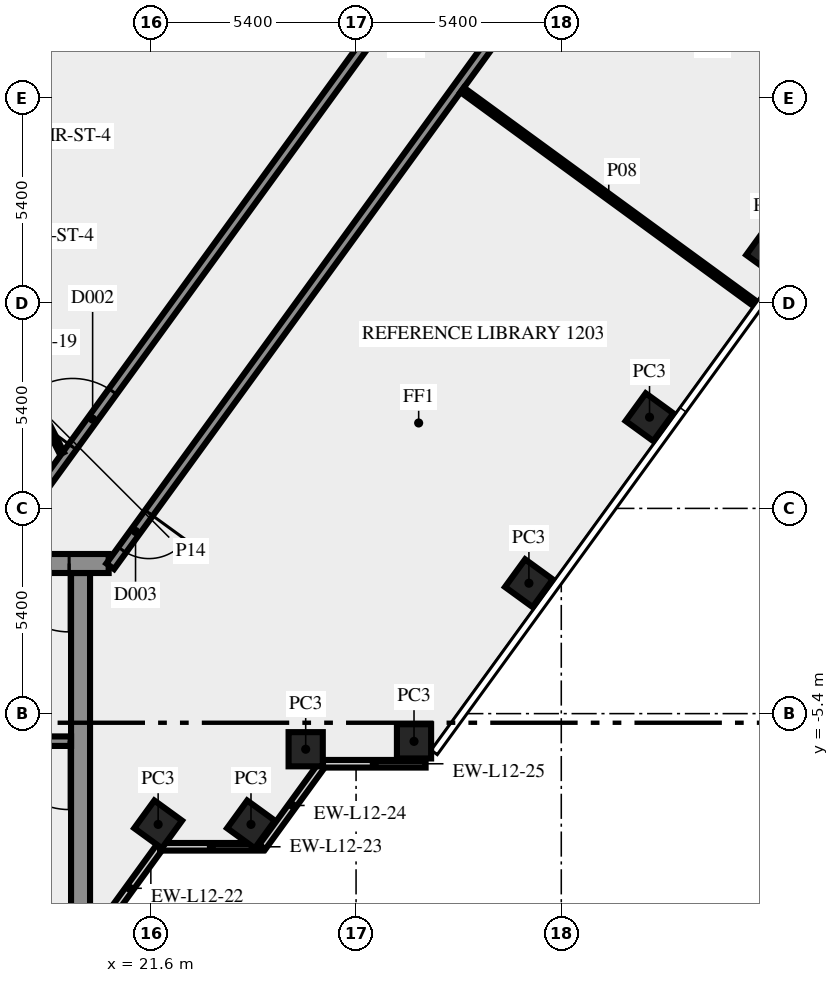
"""IFC4 building model, lengths in metres.
Left out: names, types, materials, properties, quantities, classifications, styles, units other than length and angle.
Written with IfcOpenShell. Run it as: python <this file> out.ifc"""

import sys

from ifc_helpers import new_model, si_unit, direction, frame, frame_2d, origin, origin_2d, place, context, subcontext, project, spatial, rectangle, extrude, element, fill, save


model = new_model("IFC4")
c1 = context("Model", 3, precision=1e-05, world=origin(), true_north=direction((0.0, 1.0)))
c2 = subcontext(c1, "Body", "Model", "MODEL_VIEW")
j1 = project(units=[si_unit("LENGTHUNIT", "METRE"), si_unit("PLANEANGLEUNIT", "RADIAN")], contexts=[c1])
p1 = place(None, origin())
s1 = spatial("IfcSite", under=j1, at=p1, CompositionType="ELEMENT")
p2 = place(p1, origin())
s2 = spatial("IfcBuilding", under=s1, at=p2, CompositionType="ELEMENT")
p3 = place(p2, frame((0.0, 0.0, 55.0)))
s3 = spatial("IfcBuildingStorey", under=s2, at=p3, CompositionType="ELEMENT", Elevation=55.0)
for number, where, z_axis, x_axis in (
    (1, (21.792, -8.315, 0.0), (0.0, 0.0, 1.0), (0.588, 0.809, 0.0)),
    (2, (24.235, -8.315, 0.0), (0.0, 0.0, 1.0), (0.588, 0.809, 0.0)),
    (3, (25.674, -6.337, 0.0), (0.0, 0.0, 1.0), (1.0, 0.0, 0.0)),
    (4, (28.525, -6.13, 0.0), (0.0, 0.0, 1.0), (1.0, 0.0, 0.0)),
    (5, (31.548, -1.969, 0.0), (0.0, 0.0, 1.0), (0.588, 0.809, 0.0)),
    (6, (34.722, 2.4, 0.0), (0.0, 0.0, 1.0), (0.588, 0.809, 0.0)),
    (7, (37.896, 6.769, 0.0), (0.0, 0.0, 1.0), (0.588, 0.809, 0.0)),
):
    element("IfcColumn", number, at=place(p3, frame(where, z_axis=z_axis, x_axis=x_axis)), inside=s3, PredefinedType="COLUMN", context=c2, shape_type="SweptSolid", body=[
        extrude(rectangle(XDim=0.9, YDim=0.9, at=origin_2d()), origin(), (0.0, 0.0, 1.0), 3.65),
    ])
p4 = place(p3, frame((20.253, -11.083, 0.0), z_axis=(0.0, 0.0, 1.0), x_axis=(0.587766567315, 0.809030569476, 0.0)))
e8 = element("IfcWall", 8, at=p4, inside=s3, PredefinedType="SOLIDWALL", context=c2, shape_type="SweptSolid", body=[
    extrude(rectangle(XDim=2.688, YDim=0.2, at=frame_2d((1.344, 0.0))), origin(), (0.0, 0.0, 1.0), 3.65),
])
p5 = place(p3, frame((21.843, -8.904, 0.0), z_axis=(0.0, 0.0, 1.0), x_axis=(1.0, 0.0, 0.0)))
e9 = element("IfcWall", 9, at=p5, inside=s3, PredefinedType="SOLIDWALL", context=c2, shape_type="SweptSolid", body=[
    extrude(rectangle(XDim=2.7, YDim=0.2, at=frame_2d((1.35, 0.0))), origin(), (0.0, 0.0, 1.0), 3.65),
])
p6 = place(p3, frame((24.533, -8.909, 0.0), z_axis=(0.0, 0.0, 1.0), x_axis=(0.587720002413, 0.809064397168, 0.0)))
e10 = element("IfcWall", 10, at=p6, inside=s3, PredefinedType="SOLIDWALL", context=c2, shape_type="SweptSolid", body=[
    extrude(rectangle(XDim=2.7, YDim=0.2, at=frame_2d((1.35, 0.0))), origin(), (0.0, 0.0, 1.0), 3.65),
])
p7 = place(p3, frame((26.13, -6.719, 0.0), z_axis=(0.0, 0.0, 1.0), x_axis=(1.0, 0.0, 0.0)))
e11 = element("IfcWall", 11, at=p7, inside=s3, PredefinedType="SOLIDWALL", context=c2, shape_type="SweptSolid", body=[
    extrude(rectangle(XDim=2.7, YDim=0.2, at=frame_2d((1.35, 0.0))), origin(), (0.0, 0.0, 1.0), 3.65),
])
p8 = place(p3, frame((19.75, -10.5, 0.0), z_axis=(0.0, 0.0, 1.0), x_axis=(0.0, 1.0, 0.0)))
e12 = element("IfcWall", 12, at=p8, inside=s3, PredefinedType="SHEAR", context=c2, shape_type="SweptSolid", body=[
    extrude(rectangle(XDim=8.8, YDim=0.5, at=frame_2d((4.4, 0.0))), origin(), (0.0, 0.0, 1.0), 3.65),
])
p9 = place(p3, frame((19.5, -6.125, 0.0), z_axis=(0.0, 0.0, 1.0), x_axis=(-1.0, 0.0, 0.0)))
e13 = element("IfcWall", 13, at=p9, inside=s3, PredefinedType="SHEAR", context=c2, shape_type="SweptSolid", body=[
    extrude(rectangle(XDim=8.05, YDim=0.25, at=frame_2d((4.025, 0.0))), origin(), (0.0, 0.0, 1.0), 3.65),
])
p10 = place(p9, frame((0.05, 0.0, 0.0)))
e14 = element("IfcOpeningElement", 14, at=p10, cuts=e13, PredefinedType="OPENING", context=c2, shape_type="SweptSolid", body=[
    extrude(rectangle(XDim=1.8, YDim=2.1, at=frame_2d((0.9, 1.05))), frame((0.0, 0.135, 0.0), z_axis=(0.0, -1.0, 0.0), x_axis=(1.0, 0.0, 0.0)), (0.0, 0.0, 1.0), 0.27),
])
p11 = place(p3, frame((20.49, -1.45, 0.0), z_axis=(0.0, 0.0, 1.0), x_axis=(-1.0, 0.0, 0.0)))
e15 = element("IfcWall", 15, at=p11, inside=s3, PredefinedType="SHEAR", context=c2, shape_type="SweptSolid", body=[
    extrude(rectangle(XDim=40.98, YDim=0.5, at=frame_2d((20.49, 0.0))), origin(), (0.0, 0.0, 1.0), 3.65),
])
p12 = place(p11, frame((38.14, 0.0, 0.0)))
e16 = element("IfcOpeningElement", 16, at=p12, cuts=e15, PredefinedType="OPENING", context=c2, shape_type="SweptSolid", body=[
    extrude(rectangle(XDim=1.8, YDim=2.1, at=frame_2d((0.9, 1.05))), frame((0.0, 0.26, 0.0), z_axis=(0.0, -1.0, 0.0), x_axis=(1.0, 0.0, 0.0)), (0.0, 0.0, 1.0), 0.52),
])
p13 = place(p11, frame((35.89, 0.0, 0.0)))
e17 = element("IfcOpeningElement", 17, at=p13, cuts=e15, PredefinedType="OPENING", context=c2, shape_type="SweptSolid", body=[
    extrude(rectangle(XDim=0.9, YDim=2.1, at=frame_2d((0.45, 1.05))), frame((0.0, 0.26, 0.0), z_axis=(0.0, -1.0, 0.0), x_axis=(1.0, 0.0, 0.0)), (0.0, 0.0, 1.0), 0.52),
])
p14 = place(p11, frame((32.94, 0.0, 0.0)))
e18 = element("IfcOpeningElement", 18, at=p14, cuts=e15, PredefinedType="OPENING", context=c2, shape_type="SweptSolid", body=[
    extrude(rectangle(XDim=0.9, YDim=2.1, at=frame_2d((0.45, 1.05))), frame((0.0, 0.26, 0.0), z_axis=(0.0, -1.0, 0.0), x_axis=(1.0, 0.0, 0.0)), (0.0, 0.0, 1.0), 0.52),
])
p15 = place(p11, frame((19.59, 0.0, 0.0)))
e19 = element("IfcOpeningElement", 19, at=p15, cuts=e15, PredefinedType="OPENING", context=c2, shape_type="SweptSolid", body=[
    extrude(rectangle(XDim=2.0, YDim=2.1, at=frame_2d((1.0, 1.05))), frame((0.0, 0.26, 0.0), z_axis=(0.0, -1.0, 0.0), x_axis=(1.0, 0.0, 0.0)), (0.0, 0.0, 1.0), 0.52),
])
p16 = place(p11, frame((7.14, 0.0, 0.0)))
e20 = element("IfcOpeningElement", 20, at=p16, cuts=e15, PredefinedType="OPENING", context=c2, shape_type="SweptSolid", body=[
    extrude(rectangle(XDim=0.9, YDim=2.1, at=frame_2d((0.45, 1.05))), frame((0.0, 0.26, 0.0), z_axis=(0.0, -1.0, 0.0), x_axis=(1.0, 0.0, 0.0)), (0.0, 0.0, 1.0), 0.52),
])
p17 = place(p11, frame((5.028, 0.0, 0.0)))
e21 = element("IfcOpeningElement", 21, at=p17, cuts=e15, PredefinedType="OPENING", context=c2, shape_type="SweptSolid", body=[
    extrude(rectangle(XDim=0.8, YDim=2.1, at=frame_2d((0.4, 1.05))), frame((0.0, 0.26, 0.0), z_axis=(0.0, -1.0, 0.0), x_axis=(1.0, 0.0, 0.0)), (0.0, 0.0, 1.0), 0.52),
])
p18 = place(p11, frame((3.452, 0.0, 0.0)))
e22 = element("IfcOpeningElement", 22, at=p18, cuts=e15, PredefinedType="OPENING", context=c2, shape_type="SweptSolid", body=[
    extrude(rectangle(XDim=0.8, YDim=2.1, at=frame_2d((0.4, 1.05))), frame((0.0, 0.26, 0.0), z_axis=(0.0, -1.0, 0.0), x_axis=(1.0, 0.0, 0.0)), (0.0, 0.0, 1.0), 0.52),
])
p19 = place(p11, frame((1.04, 0.0, 0.0)))
e23 = element("IfcOpeningElement", 23, at=p19, cuts=e15, PredefinedType="OPENING", context=c2, shape_type="SweptSolid", body=[
    extrude(rectangle(XDim=1.8, YDim=2.1, at=frame_2d((0.9, 1.05))), frame((0.0, 0.26, 0.0), z_axis=(0.0, -1.0, 0.0), x_axis=(1.0, 0.0, 0.0)), (0.0, 0.0, 1.0), 0.52),
])
p20 = place(p3, frame((17.545, -1.125, 0.0), z_axis=(0.0, 0.0, 1.0), x_axis=(0.587786323093, 0.809016216391, 0.0)))
e24 = element("IfcWall", 24, at=p20, inside=s3, PredefinedType="SOLIDWALL", context=c2, shape_type="SweptSolid", body=[
    extrude(rectangle(XDim=33.493, YDim=0.25, at=frame_2d((16.747, 0.0))), origin(), (0.0, 0.0, 1.0), 3.65),
])
p21 = place(p20, frame((31.403, 0.0, 0.0)))
e25 = element("IfcOpeningElement", 25, at=p21, cuts=e24, PredefinedType="OPENING", context=c2, shape_type="SweptSolid", body=[
    extrude(rectangle(XDim=1.8, YDim=2.1, at=frame_2d((0.9, 1.05))), frame((0.0, 0.135, 0.0), z_axis=(0.0, -1.0, 0.0), x_axis=(1.0, 0.0, 0.0)), (0.0, 0.0, 1.0), 0.27),
])
p22 = place(p20, frame((3.392, 0.0, 0.0)))
e26 = element("IfcOpeningElement", 26, at=p22, cuts=e24, PredefinedType="OPENING", context=c2, shape_type="SweptSolid", body=[
    extrude(rectangle(XDim=1.8, YDim=2.1, at=frame_2d((0.9, 1.05))), frame((0.0, 0.135, 0.0), z_axis=(0.0, -1.0, 0.0), x_axis=(1.0, 0.0, 0.0)), (0.0, 0.0, 1.0), 0.27),
])
p23 = place(p3, frame((43.467, 30.045, 0.0), z_axis=(0.0, 0.0, 1.0), x_axis=(-0.587784726077, -0.809017376692, 0.0)))
e27 = element("IfcWall", 27, at=p23, inside=s3, PredefinedType="SOLIDWALL", context=c2, shape_type="SweptSolid", body=[
    extrude(rectangle(XDim=39.02, YDim=0.25, at=frame_2d((19.51, 0.0))), origin(), (0.0, 0.0, 1.0), 3.65),
])
p24 = place(p23, frame((11.404, 0.0, 0.0)))
e28 = element("IfcOpeningElement", 28, at=p24, cuts=e27, PredefinedType="OPENING", context=c2, shape_type="SweptSolid", body=[
    extrude(rectangle(XDim=0.9, YDim=2.1, at=frame_2d((0.45, 1.05))), frame((0.0, 0.135, 0.0), z_axis=(0.0, -1.0, 0.0), x_axis=(1.0, 0.0, 0.0)), (0.0, 0.0, 1.0), 0.27),
])
p25 = place(p23, frame((13.004, 0.0, 0.0)))
e29 = element("IfcOpeningElement", 29, at=p25, cuts=e27, PredefinedType="OPENING", context=c2, shape_type="SweptSolid", body=[
    extrude(rectangle(XDim=1.0, YDim=2.1, at=frame_2d((0.5, 1.05))), frame((0.0, 0.135, 0.0), z_axis=(0.0, -1.0, 0.0), x_axis=(1.0, 0.0, 0.0)), (0.0, 0.0, 1.0), 0.27),
])
p26 = place(p23, frame((37.287, 0.0, 0.0)))
e30 = element("IfcOpeningElement", 30, at=p26, cuts=e27, PredefinedType="OPENING", context=c2, shape_type="SweptSolid", body=[
    extrude(rectangle(XDim=1.2, YDim=2.1, at=frame_2d((0.6, 1.05))), frame((0.0, 0.135, 0.0), z_axis=(0.0, -1.0, 0.0), x_axis=(1.0, 0.0, 0.0)), (0.0, 0.0, 1.0), 0.27),
])
p27 = place(p23, frame((0.224, 0.0, 0.0)))
e31 = element("IfcOpeningElement", 31, at=p27, cuts=e27, PredefinedType="OPENING", context=c2, shape_type="SweptSolid", body=[
    extrude(rectangle(XDim=0.9, YDim=2.1, at=frame_2d((0.45, 1.05))), frame((0.0, 0.135, 0.0), z_axis=(0.0, -1.0, 0.0), x_axis=(1.0, 0.0, 0.0)), (0.0, 0.0, 1.0), 0.27),
])
p28 = place(p3, frame((29.793, 11.012, 0.0), z_axis=(0.0, 0.0, 1.0), x_axis=(0.807645841498, -0.589667868135, 0.0)))
e32 = element("IfcWall", 32, at=p28, inside=s3, PredefinedType="PARTITIONING", context=c2, shape_type="SweptSolid", body=[
    extrude(rectangle(XDim=9.551, YDim=0.15, at=frame_2d((4.775, 0.0))), origin(), (0.0, 0.0, 1.0), 2.75),
])
p29 = place(p3, frame((18.0, 3.925, 0.0), z_axis=(0.0, 0.0, 1.0), x_axis=(0.453950796792, -0.891026752736, 0.0)))
e33 = element("IfcWall", 33, at=p29, inside=s3, PredefinedType="PARTITIONING", context=c2, shape_type="SweptSolid", body=[
    extrude(rectangle(XDim=2.778, YDim=0.12, at=frame_2d((1.389, 0.0))), origin(), (0.0, 0.0, 1.0), 3.65),
])
p30 = place(p10, origin())
e34 = element("IfcDoor", 34, at=p30, inside=s3, OperationType="DOUBLE_DOOR_SINGLE_SWING", PredefinedType="DOOR", context=c2, shape_type="SweptSolid", body=[
    extrude(rectangle(XDim=1.8, YDim=2.1, at=frame_2d((0.9, 1.05))), frame((0.0, 0.025, 0.0), z_axis=(0.0, -1.0, 0.0), x_axis=(1.0, 0.0, 0.0)), (0.0, 0.0, 1.0), 0.05),
])
fill(e14, e34)
p31 = place(p19, origin())
e35 = element("IfcDoor", 35, at=p31, inside=s3, OperationType="DOUBLE_DOOR_SINGLE_SWING", PredefinedType="DOOR", context=c2, shape_type="SweptSolid", body=[
    extrude(rectangle(XDim=1.8, YDim=2.1, at=frame_2d((0.9, 1.05))), frame((0.0, 0.025, 0.0), z_axis=(0.0, -1.0, 0.0), x_axis=(1.0, 0.0, 0.0)), (0.0, 0.0, 1.0), 0.05),
])
fill(e23, e35)
p32 = place(p22, origin())
e36 = element("IfcDoor", 36, at=p32, inside=s3, OperationType="DOUBLE_DOOR_SINGLE_SWING", PredefinedType="DOOR", context=c2, shape_type="SweptSolid", body=[
    extrude(rectangle(XDim=1.8, YDim=2.1, at=frame_2d((0.9, 1.05))), frame((0.0, 0.025, 0.0), z_axis=(0.0, -1.0, 0.0), x_axis=(1.0, 0.0, 0.0)), (0.0, 0.0, 1.0), 0.05),
])
fill(e26, e36)
p33 = place(p26, origin())
e37 = element("IfcDoor", 37, at=p33, inside=s3, OperationType="SINGLE_SWING_RIGHT", PredefinedType="DOOR", context=c2, shape_type="SweptSolid", body=[
    extrude(rectangle(XDim=1.2, YDim=2.1, at=frame_2d((0.6, 1.05))), frame((0.0, 0.025, 0.0), z_axis=(0.0, -1.0, 0.0), x_axis=(1.0, 0.0, 0.0)), (0.0, 0.0, 1.0), 0.05),
])
fill(e30, e37)
save(model, sys.argv[1])
